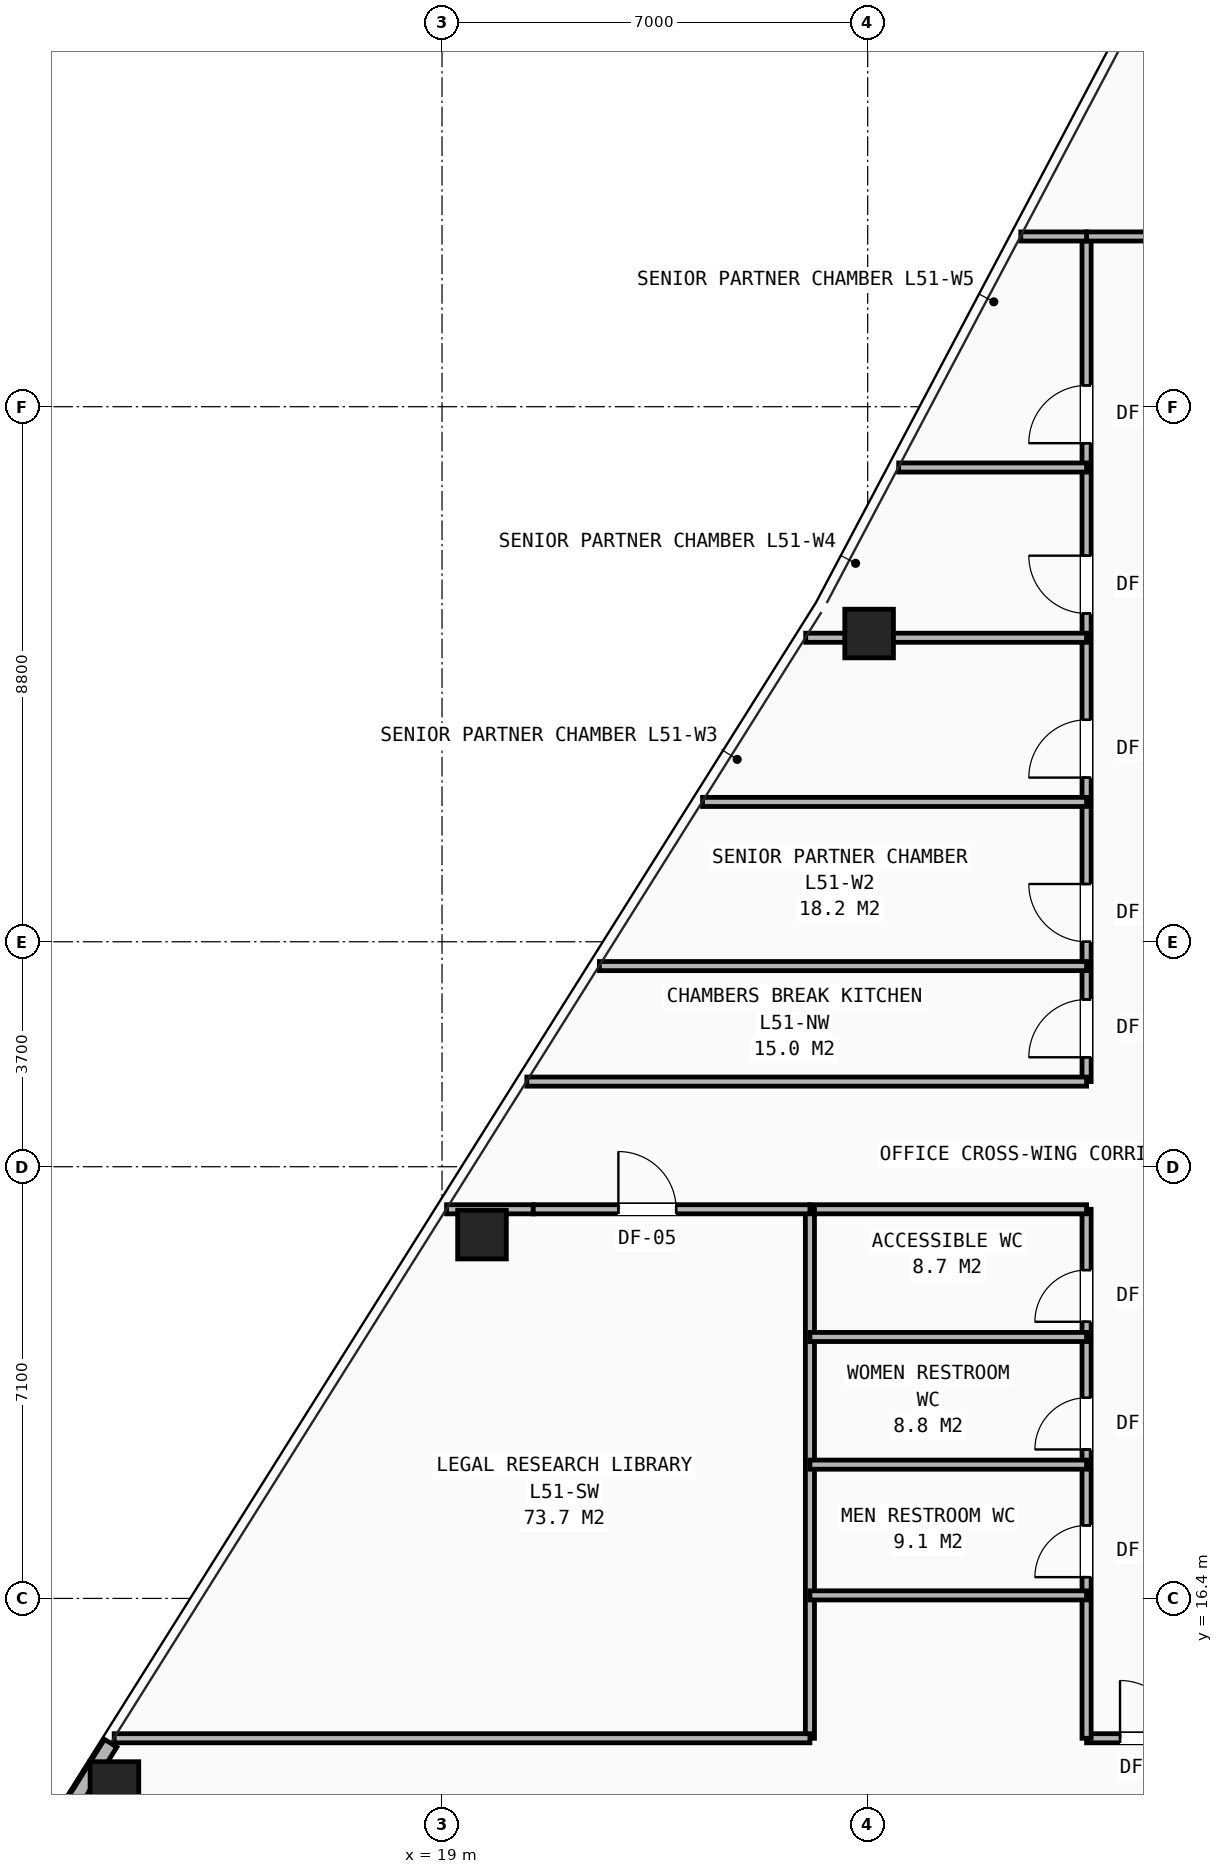
"""IFC4 building model, lengths in metres.
Left out: names, types, materials, properties, quantities, classifications, styles, units other than length and angle.
Written with IfcOpenShell. Run it as: python <this file> out.ifc"""

import sys

from ifc_helpers import new_model, si_unit, direction, frame, frame_2d, origin, origin_2d, place, context, subcontext, project, spatial, rectangle, hollow_rectangle, extrude, element, fill, save


model = new_model("IFC4")
c1 = context("Model", 3, precision=1e-05, world=origin(), true_north=direction((0.0, 1.0)))
c2 = subcontext(c1, "Body", "Model", "MODEL_VIEW")
j1 = project(units=[si_unit("LENGTHUNIT", "METRE"), si_unit("PLANEANGLEUNIT", "RADIAN")], contexts=[c1])
p1 = place(None, origin())
s1 = spatial("IfcSite", under=j1, at=p1, CompositionType="ELEMENT")
p2 = place(p1, origin())
s2 = spatial("IfcBuilding", under=s1, at=p2, CompositionType="ELEMENT")
p3 = place(p2, frame((0.0, 0.0, 179.25)))
s3 = spatial("IfcBuildingStorey", under=s2, at=p3, CompositionType="ELEMENT", Elevation=179.25)
for number, where, z_axis, x_axis in (
    (1, (26.024, 32.269, 0.0), (0.0, 0.0, 1.0), (1.0, 0.0, 0.0)),
    (2, (19.657, 22.384, 0.0), (0.0, 0.0, 1.0), (1.0, 0.0, 0.0)),
    (3, (13.612, 13.314, 0.0), (0.0, 0.0, 1.0), (1.0, 0.0, 0.0)),
):
    element("IfcColumn", number, at=place(p3, frame(where, z_axis=z_axis, x_axis=x_axis)), inside=s3, PredefinedType="COLUMN", context=c2, shape_type="SweptSolid", body=[
        extrude(hollow_rectangle(XDim=0.8, YDim=0.8, WallThickness=0.055, at=origin_2d()), origin(), (0.0, 0.0, 1.0), 3.45),
    ])
p4 = place(p3, frame((13.551, 14.018, 0.0), z_axis=(0.0, 0.0, 1.0), x_axis=(-0.531987132085, -0.846752438022, 0.0)))
e4 = element("IfcWall", 4, at=p4, inside=s3, PredefinedType="SHEAR", context=c2, shape_type="SweptSolid", body=[
    extrude(rectangle(XDim=1.302, YDim=0.24, at=frame_2d((0.651, 0.0))), origin(), (0.0, 0.0, 1.0), 2.583),
])
p5 = place(p3, frame((29.6, 14.1, 0.0), z_axis=(0.0, 0.0, 1.0), x_axis=(1.0, 0.0, 0.0)))
e5 = element("IfcWall", 5, at=p5, inside=s3, PredefinedType="PARTITIONING", context=c2, shape_type="SweptSolid", body=[
    extrude(rectangle(XDim=18.6, YDim=0.15, at=frame_2d((9.3, 0.0))), origin(), (0.0, 0.0, 1.0), 2.225),
])
p6 = place(p5, frame((0.55, 0.0, 0.0)))
e6 = element("IfcOpeningElement", 6, at=p6, cuts=e5, PredefinedType="OPENING", context=c2, shape_type="SweptSolid", body=[
    extrude(rectangle(XDim=0.95, YDim=2.1, at=frame_2d((0.475, 1.05))), frame((0.0, 0.085, 0.0), z_axis=(0.0, -1.0, 0.0), x_axis=(1.0, 0.0, 0.0)), (0.0, 0.0, 1.0), 0.17),
])
p7 = place(p5, frame((2.25, 0.0, 0.0)))
e7 = element("IfcOpeningElement", 7, at=p7, cuts=e5, PredefinedType="OPENING", context=c2, shape_type="SweptSolid", body=[
    extrude(rectangle(XDim=0.95, YDim=2.1, at=frame_2d((0.475, 1.05))), frame((0.0, 0.085, 0.0), z_axis=(0.0, -1.0, 0.0), x_axis=(1.0, 0.0, 0.0)), (0.0, 0.0, 1.0), 0.17),
])
p8 = place(p5, frame((5.95, 0.0, 0.0)))
e8 = element("IfcOpeningElement", 8, at=p8, cuts=e5, PredefinedType="OPENING", context=c2, shape_type="SweptSolid", body=[
    extrude(rectangle(XDim=0.95, YDim=2.1, at=frame_2d((0.475, 1.05))), frame((0.0, 0.085, 0.0), z_axis=(0.0, -1.0, 0.0), x_axis=(1.0, 0.0, 0.0)), (0.0, 0.0, 1.0), 0.17),
])
p9 = place(p5, frame((9.75, 0.0, 0.0)))
e9 = element("IfcOpeningElement", 9, at=p9, cuts=e5, PredefinedType="OPENING", context=c2, shape_type="SweptSolid", body=[
    extrude(rectangle(XDim=0.95, YDim=2.1, at=frame_2d((0.475, 1.05))), frame((0.0, 0.085, 0.0), z_axis=(0.0, -1.0, 0.0), x_axis=(1.0, 0.0, 0.0)), (0.0, 0.0, 1.0), 0.17),
])
p10 = place(p5, frame((13.55, 0.0, 0.0)))
e10 = element("IfcOpeningElement", 10, at=p10, cuts=e5, PredefinedType="OPENING", context=c2, shape_type="SweptSolid", body=[
    extrude(rectangle(XDim=0.95, YDim=2.1, at=frame_2d((0.475, 1.05))), frame((0.0, 0.085, 0.0), z_axis=(0.0, -1.0, 0.0), x_axis=(1.0, 0.0, 0.0)), (0.0, 0.0, 1.0), 0.17),
])
p11 = place(p5, frame((16.95, 0.0, 0.0)))
e11 = element("IfcOpeningElement", 11, at=p11, cuts=e5, PredefinedType="OPENING", context=c2, shape_type="SweptSolid", body=[
    extrude(rectangle(XDim=0.95, YDim=2.1, at=frame_2d((0.475, 1.05))), frame((0.0, 0.085, 0.0), z_axis=(0.0, -1.0, 0.0), x_axis=(1.0, 0.0, 0.0)), (0.0, 0.0, 1.0), 0.17),
])
p12 = place(p3, frame((29.6, 14.1, 0.0), z_axis=(0.0, 0.0, 1.0), x_axis=(0.0, 1.0, 0.0)))
e12 = element("IfcWall", 12, at=p12, inside=s3, PredefinedType="PARTITIONING", context=c2, shape_type="SweptSolid", body=[
    extrude(rectangle(XDim=8.7, YDim=0.15, at=frame_2d((4.35, 0.0))), origin(), (0.0, 0.0, 1.0), 3.21),
])
p13 = place(p12, frame((2.65, 0.0, 0.0)))
e13 = element("IfcOpeningElement", 13, at=p13, cuts=e12, PredefinedType="OPENING", context=c2, shape_type="SweptSolid", body=[
    extrude(rectangle(XDim=0.85, YDim=2.05, at=frame_2d((0.425, 1.025))), frame((0.0, 0.085, 0.0), z_axis=(0.0, -1.0, 0.0), x_axis=(1.0, 0.0, 0.0)), (0.0, 0.0, 1.0), 0.17),
])
p14 = place(p12, frame((4.75, 0.0, 0.0)))
e14 = element("IfcOpeningElement", 14, at=p14, cuts=e12, PredefinedType="OPENING", context=c2, shape_type="SweptSolid", body=[
    extrude(rectangle(XDim=0.85, YDim=2.05, at=frame_2d((0.425, 1.025))), frame((0.0, 0.085, 0.0), z_axis=(0.0, -1.0, 0.0), x_axis=(1.0, 0.0, 0.0)), (0.0, 0.0, 1.0), 0.17),
])
p15 = place(p12, frame((6.85, 0.0, 0.0)))
e15 = element("IfcOpeningElement", 15, at=p15, cuts=e12, PredefinedType="OPENING", context=c2, shape_type="SweptSolid", body=[
    extrude(rectangle(XDim=0.85, YDim=2.05, at=frame_2d((0.425, 1.025))), frame((0.0, 0.085, 0.0), z_axis=(0.0, -1.0, 0.0), x_axis=(1.0, 0.0, 0.0)), (0.0, 0.0, 1.0), 0.17),
])
p16 = place(p3, frame((29.6, 24.9, 0.0), z_axis=(0.0, 0.0, 1.0), x_axis=(0.0, 1.0, 0.0)))
e16 = element("IfcWall", 16, at=p16, inside=s3, PredefinedType="PARTITIONING", context=c2, shape_type="SweptSolid", body=[
    extrude(rectangle(XDim=13.9, YDim=0.15, at=frame_2d((6.95, 0.0))), origin(), (0.0, 0.0, 1.0), 2.225),
])
p17 = place(p16, frame((0.4, 0.0, 0.0)))
e17 = element("IfcOpeningElement", 17, at=p17, cuts=e16, PredefinedType="OPENING", context=c2, shape_type="SweptSolid", body=[
    extrude(rectangle(XDim=0.95, YDim=2.1, at=frame_2d((0.475, 1.05))), frame((0.0, 0.085, 0.0), z_axis=(0.0, -1.0, 0.0), x_axis=(1.0, 0.0, 0.0)), (0.0, 0.0, 1.0), 0.17),
])
p18 = place(p16, frame((2.3, 0.0, 0.0)))
e18 = element("IfcOpeningElement", 18, at=p18, cuts=e16, PredefinedType="OPENING", context=c2, shape_type="SweptSolid", body=[
    extrude(rectangle(XDim=0.95, YDim=2.1, at=frame_2d((0.475, 1.05))), frame((0.0, 0.085, 0.0), z_axis=(0.0, -1.0, 0.0), x_axis=(1.0, 0.0, 0.0)), (0.0, 0.0, 1.0), 0.17),
])
p19 = place(p16, frame((5.0, 0.0, 0.0)))
e19 = element("IfcOpeningElement", 19, at=p19, cuts=e16, PredefinedType="OPENING", context=c2, shape_type="SweptSolid", body=[
    extrude(rectangle(XDim=0.95, YDim=2.1, at=frame_2d((0.475, 1.05))), frame((0.0, 0.085, 0.0), z_axis=(0.0, -1.0, 0.0), x_axis=(1.0, 0.0, 0.0)), (0.0, 0.0, 1.0), 0.17),
])
p20 = place(p16, frame((7.7, 0.0, 0.0)))
e20 = element("IfcOpeningElement", 20, at=p20, cuts=e16, PredefinedType="OPENING", context=c2, shape_type="SweptSolid", body=[
    extrude(rectangle(XDim=0.95, YDim=2.1, at=frame_2d((0.475, 1.05))), frame((0.0, 0.085, 0.0), z_axis=(0.0, -1.0, 0.0), x_axis=(1.0, 0.0, 0.0)), (0.0, 0.0, 1.0), 0.17),
])
p21 = place(p16, frame((10.5, 0.0, 0.0)))
e21 = element("IfcOpeningElement", 21, at=p21, cuts=e16, PredefinedType="OPENING", context=c2, shape_type="SweptSolid", body=[
    extrude(rectangle(XDim=0.95, YDim=2.1, at=frame_2d((0.475, 1.05))), frame((0.0, 0.085, 0.0), z_axis=(0.0, -1.0, 0.0), x_axis=(1.0, 0.0, 0.0)), (0.0, 0.0, 1.0), 0.17),
])
p22 = place(p3, frame((29.6, 38.8, 0.0), z_axis=(0.0, 0.0, 1.0), x_axis=(1.0, 0.0, 0.0)))
e22 = element("IfcWall", 22, at=p22, inside=s3, PredefinedType="PARTITIONING", context=c2, shape_type="SweptSolid", body=[
    extrude(rectangle(XDim=2.2, YDim=0.15, at=frame_2d((1.1, 0.0))), origin(), (0.0, 0.0, 1.0), 2.589),
])
p23 = place(p3, frame((19.074, 22.8, 0.0), z_axis=(0.0, 0.0, 1.0), x_axis=(1.0, 0.0, 0.0)))
e23 = element("IfcWall", 23, at=p23, inside=s3, PredefinedType="PARTITIONING", context=c2, shape_type="SweptSolid", body=[
    extrude(rectangle(XDim=1.426, YDim=0.15, at=frame_2d((0.713, 0.0))), origin(), (0.0, 0.0, 1.0), 2.589),
])
p24 = place(p3, frame((25.05, 22.8, 0.0), z_axis=(0.0, 0.0, 1.0), x_axis=(1.0, 0.0, 0.0)))
e24 = element("IfcWall", 24, at=p24, inside=s3, PredefinedType="PARTITIONING", context=c2, shape_type="SweptSolid", body=[
    extrude(rectangle(XDim=4.55, YDim=0.15, at=frame_2d((2.275, 0.0))), origin(), (0.0, 0.0, 1.0), 3.21),
])
p25 = place(p3, frame((20.394, 24.9, 0.0), z_axis=(0.0, 0.0, 1.0), x_axis=(1.0, 0.0, 0.0)))
e25 = element("IfcWall", 25, at=p25, inside=s3, PredefinedType="PARTITIONING", context=c2, shape_type="SweptSolid", body=[
    extrude(rectangle(XDim=9.206, YDim=0.15, at=frame_2d((4.603, 0.0))), origin(), (0.0, 0.0, 1.0), 2.589),
])
p26 = place(p3, frame((25.05, 14.1, 0.0), z_axis=(0.0, 0.0, 1.0), x_axis=(0.0, 1.0, 0.0)))
e26 = element("IfcWall", 26, at=p26, inside=s3, PredefinedType="PARTITIONING", context=c2, shape_type="SweptSolid", body=[
    extrude(rectangle(XDim=8.7, YDim=0.15, at=frame_2d((4.35, 0.0))), origin(), (0.0, 0.0, 1.0), 3.21),
])
for number, where, z_axis, x_axis in (
    (27, (25.05, 16.45, 0.0), (0.0, 0.0, 1.0), (1.0, 0.0, 0.0)),
    (28, (25.05, 18.6, 0.0), (0.0, 0.0, 1.0), (1.0, 0.0, 0.0)),
    (29, (25.05, 20.7, 0.0), (0.0, 0.0, 1.0), (1.0, 0.0, 0.0)),
):
    element("IfcWall", number, at=place(p3, frame(where, z_axis=z_axis, x_axis=x_axis)), inside=s3, PredefinedType="PARTITIONING", context=c2, shape_type="SweptSolid", body=[
        extrude(rectangle(XDim=4.55, YDim=0.15, at=frame_2d((2.275, 0.0))), origin(), (0.0, 0.0, 1.0), 3.21),
    ])
p27 = place(p3, frame((13.608, 14.1, 0.0), z_axis=(0.0, 0.0, 1.0), x_axis=(1.0, 0.0, 0.0)))
e30 = element("IfcWall", 30, at=p27, inside=s3, PredefinedType="PARTITIONING", context=c2, shape_type="SweptSolid", body=[
    extrude(rectangle(XDim=11.442, YDim=0.15, at=frame_2d((5.721, 0.0))), origin(), (0.0, 0.0, 1.0), 2.589),
])
p28 = place(p3, frame((20.5, 22.8, 0.0), z_axis=(0.0, 0.0, 1.0), x_axis=(1.0, 0.0, 0.0)))
e31 = element("IfcWall", 31, at=p28, inside=s3, PredefinedType="PARTITIONING", context=c2, shape_type="SweptSolid", body=[
    extrude(rectangle(XDim=4.55, YDim=0.15, at=frame_2d((2.275, 0.0))), origin(), (0.0, 0.0, 1.0), 3.21),
])
p29 = place(p28, frame((1.4, 0.0, 0.0)))
e32 = element("IfcOpeningElement", 32, at=p29, cuts=e31, PredefinedType="OPENING", context=c2, shape_type="SweptSolid", body=[
    extrude(rectangle(XDim=0.95, YDim=2.1, at=frame_2d((0.475, 1.05))), frame((0.0, 0.085, 0.0), z_axis=(0.0, -1.0, 0.0), x_axis=(1.0, 0.0, 0.0)), (0.0, 0.0, 1.0), 0.17),
])
p30 = place(p3, frame((28.518, 38.8, 0.0), z_axis=(0.0, 0.0, 1.0), x_axis=(1.0, 0.0, 0.0)))
e33 = element("IfcWall", 33, at=p30, inside=s3, PredefinedType="PARTITIONING", context=c2, shape_type="SweptSolid", body=[
    extrude(rectangle(XDim=1.082, YDim=0.15, at=frame_2d((0.541, 0.0))), origin(), (0.0, 0.0, 1.0), 2.589),
])
p31 = place(p3, frame((21.588, 26.8, 0.0), z_axis=(0.0, 0.0, 1.0), x_axis=(1.0, 0.0, 0.0)))
e34 = element("IfcWall", 34, at=p31, inside=s3, PredefinedType="PARTITIONING", context=c2, shape_type="SweptSolid", body=[
    extrude(rectangle(XDim=8.012, YDim=0.15, at=frame_2d((4.006, 0.0))), origin(), (0.0, 0.0, 1.0), 2.589),
])
p32 = place(p3, frame((23.284, 29.5, 0.0), z_axis=(0.0, 0.0, 1.0), x_axis=(1.0, 0.0, 0.0)))
e35 = element("IfcWall", 35, at=p32, inside=s3, PredefinedType="PARTITIONING", context=c2, shape_type="SweptSolid", body=[
    extrude(rectangle(XDim=6.316, YDim=0.15, at=frame_2d((3.158, 0.0))), origin(), (0.0, 0.0, 1.0), 2.589),
])
p33 = place(p3, frame((24.981, 32.2, 0.0), z_axis=(0.0, 0.0, 1.0), x_axis=(1.0, 0.0, 0.0)))
e36 = element("IfcWall", 36, at=p33, inside=s3, PredefinedType="PARTITIONING", context=c2, shape_type="SweptSolid", body=[
    extrude(rectangle(XDim=4.619, YDim=0.15, at=frame_2d((2.31, 0.0))), origin(), (0.0, 0.0, 1.0), 2.225),
])
p34 = place(p3, frame((26.51, 35.0, 0.0), z_axis=(0.0, 0.0, 1.0), x_axis=(1.0, 0.0, 0.0)))
e37 = element("IfcWall", 37, at=p34, inside=s3, PredefinedType="PARTITIONING", context=c2, shape_type="SweptSolid", body=[
    extrude(rectangle(XDim=3.09, YDim=0.15, at=frame_2d((1.545, 0.0))), origin(), (0.0, 0.0, 1.0), 2.589),
])
p35 = place(p13, origin())
e38 = element("IfcDoor", 38, at=p35, inside=s3, OperationType="SINGLE_SWING_LEFT", PredefinedType="DOOR", context=c2, shape_type="SweptSolid", body=[
    extrude(rectangle(XDim=0.85, YDim=2.05, at=frame_2d((0.425, 1.025))), frame((0.0, 0.025, 0.0), z_axis=(0.0, -1.0, 0.0), x_axis=(1.0, 0.0, 0.0)), (0.0, 0.0, 1.0), 0.05),
])
fill(e13, e38)
p36 = place(p14, origin())
e39 = element("IfcDoor", 39, at=p36, inside=s3, OperationType="SINGLE_SWING_LEFT", PredefinedType="DOOR", context=c2, shape_type="SweptSolid", body=[
    extrude(rectangle(XDim=0.85, YDim=2.05, at=frame_2d((0.425, 1.025))), frame((0.0, 0.025, 0.0), z_axis=(0.0, -1.0, 0.0), x_axis=(1.0, 0.0, 0.0)), (0.0, 0.0, 1.0), 0.05),
])
fill(e14, e39)
p37 = place(p15, origin())
e40 = element("IfcDoor", 40, at=p37, inside=s3, OperationType="SINGLE_SWING_LEFT", PredefinedType="DOOR", context=c2, shape_type="SweptSolid", body=[
    extrude(rectangle(XDim=0.85, YDim=2.05, at=frame_2d((0.425, 1.025))), frame((0.0, 0.025, 0.0), z_axis=(0.0, -1.0, 0.0), x_axis=(1.0, 0.0, 0.0)), (0.0, 0.0, 1.0), 0.05),
])
fill(e15, e40)
p38 = place(p6, origin())
e41 = element("IfcDoor", 41, at=p38, inside=s3, OperationType="SINGLE_SWING_LEFT", PredefinedType="DOOR", context=c2, shape_type="SweptSolid", body=[
    extrude(rectangle(XDim=0.95, YDim=2.1, at=frame_2d((0.475, 1.05))), frame((0.0, 0.025, 0.0), z_axis=(0.0, -1.0, 0.0), x_axis=(1.0, 0.0, 0.0)), (0.0, 0.0, 1.0), 0.05),
])
fill(e6, e41)
p39 = place(p29, origin())
e42 = element("IfcDoor", 42, at=p39, inside=s3, OperationType="SINGLE_SWING_LEFT", PredefinedType="DOOR", context=c2, shape_type="SweptSolid", body=[
    extrude(rectangle(XDim=0.95, YDim=2.1, at=frame_2d((0.475, 1.05))), frame((0.0, 0.025, 0.0), z_axis=(0.0, -1.0, 0.0), x_axis=(1.0, 0.0, 0.0)), (0.0, 0.0, 1.0), 0.05),
])
fill(e32, e42)
p40 = place(p17, origin())
e43 = element("IfcDoor", 43, at=p40, inside=s3, OperationType="SINGLE_SWING_LEFT", PredefinedType="DOOR", context=c2, shape_type="SweptSolid", body=[
    extrude(rectangle(XDim=0.95, YDim=2.1, at=frame_2d((0.475, 1.05))), frame((0.0, 0.025, 0.0), z_axis=(0.0, -1.0, 0.0), x_axis=(1.0, 0.0, 0.0)), (0.0, 0.0, 1.0), 0.05),
])
fill(e17, e43)
p41 = place(p18, origin())
e44 = element("IfcDoor", 44, at=p41, inside=s3, OperationType="SINGLE_SWING_RIGHT", PredefinedType="DOOR", context=c2, shape_type="SweptSolid", body=[
    extrude(rectangle(XDim=0.95, YDim=2.1, at=frame_2d((0.475, 1.05))), frame((0.0, 0.025, 0.0), z_axis=(0.0, -1.0, 0.0), x_axis=(1.0, 0.0, 0.0)), (0.0, 0.0, 1.0), 0.05),
])
fill(e18, e44)
p42 = place(p19, origin())
e45 = element("IfcDoor", 45, at=p42, inside=s3, OperationType="SINGLE_SWING_LEFT", PredefinedType="DOOR", context=c2, shape_type="SweptSolid", body=[
    extrude(rectangle(XDim=0.95, YDim=2.1, at=frame_2d((0.475, 1.05))), frame((0.0, 0.025, 0.0), z_axis=(0.0, -1.0, 0.0), x_axis=(1.0, 0.0, 0.0)), (0.0, 0.0, 1.0), 0.05),
])
fill(e19, e45)
p43 = place(p20, origin())
e46 = element("IfcDoor", 46, at=p43, inside=s3, OperationType="SINGLE_SWING_RIGHT", PredefinedType="DOOR", context=c2, shape_type="SweptSolid", body=[
    extrude(rectangle(XDim=0.95, YDim=2.1, at=frame_2d((0.475, 1.05))), frame((0.0, 0.025, 0.0), z_axis=(0.0, -1.0, 0.0), x_axis=(1.0, 0.0, 0.0)), (0.0, 0.0, 1.0), 0.05),
])
fill(e20, e46)
p44 = place(p21, origin())
e47 = element("IfcDoor", 47, at=p44, inside=s3, OperationType="SINGLE_SWING_LEFT", PredefinedType="DOOR", context=c2, shape_type="SweptSolid", body=[
    extrude(rectangle(XDim=0.95, YDim=2.1, at=frame_2d((0.475, 1.05))), frame((0.0, 0.025, 0.0), z_axis=(0.0, -1.0, 0.0), x_axis=(1.0, 0.0, 0.0)), (0.0, 0.0, 1.0), 0.05),
])
fill(e21, e47)
save(model, sys.argv[1])
